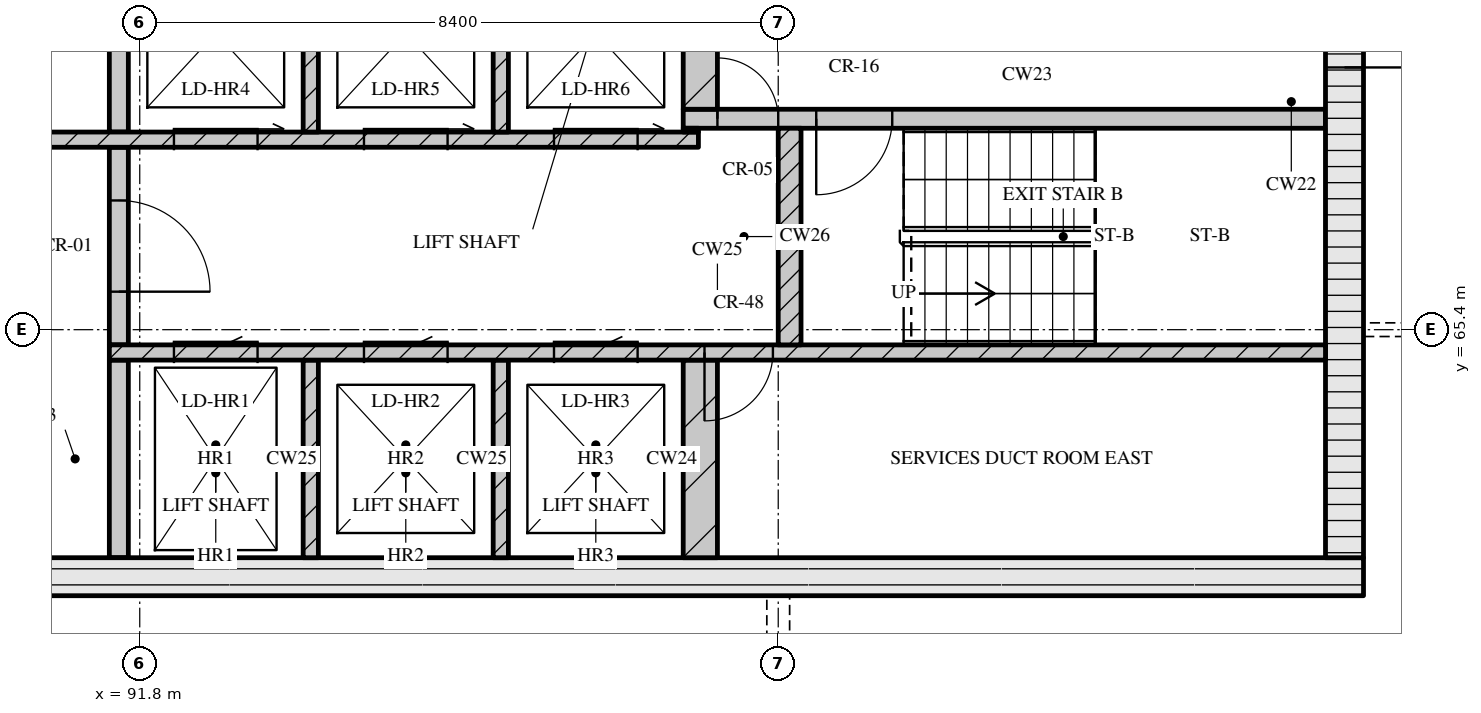
"""IFC4 building model, lengths in metres.
Left out: names, types, materials, properties, quantities, classifications, styles, units other than length and angle.
Written with IfcOpenShell. Run it as: python <this file> out.ifc"""

import sys

from ifc_helpers import new_model, si_unit, direction, frame, frame_2d, origin, place, context, subcontext, project, spatial, rectangle, extrude, element, fill, save


model = new_model("IFC4")
c1 = context("Model", 3, precision=1e-05, world=origin(), true_north=direction((0.0, 1.0)))
c2 = subcontext(c1, "Body", "Model", "MODEL_VIEW")
j1 = project(units=[si_unit("LENGTHUNIT", "METRE"), si_unit("PLANEANGLEUNIT", "RADIAN")], contexts=[c1])
p1 = place(None, origin())
s1 = spatial("IfcSite", under=j1, at=p1, CompositionType="ELEMENT")
p2 = place(p1, origin())
s2 = spatial("IfcBuilding", under=s1, at=p2, CompositionType="ELEMENT")
p3 = place(p2, frame((0.0, 0.0, 295.95)))
s3 = spatial("IfcBuildingStorey", under=s2, at=p3, CompositionType="ELEMENT", Elevation=295.95)
p4 = place(p3, frame((67.3, 62.15, 0.0), z_axis=(0.0, 0.0, 1.0), x_axis=(1.0, 0.0, 0.0)))
e1 = element("IfcWall", 1, at=p4, inside=s3, PredefinedType="SOLIDWALL", context=c2, shape_type="SweptSolid", body=[
    extrude(rectangle(XDim=40.6, YDim=0.5, at=frame_2d((20.3, 0.0))), origin(), (0.0, 0.0, 1.0), 3.32),
])
p5 = place(p4, frame((20.65, 0.0, 0.0)))
e2 = element("IfcOpeningElement", 2, at=p5, cuts=e1, PredefinedType="OPENING", context=c2, shape_type="SweptSolid", body=[
    extrude(rectangle(XDim=1.8, YDim=2.1, at=frame_2d((0.9, 1.05))), frame((0.0, 0.26, 0.0), z_axis=(0.0, -1.0, 0.0), x_axis=(1.0, 0.0, 0.0)), (0.0, 0.0, 1.0), 0.52),
])
p6 = place(p3, frame((107.65, 62.4, 0.0), z_axis=(0.0, 0.0, 1.0), x_axis=(0.0, 1.0, 0.0)))
e3 = element("IfcWall", 3, at=p6, inside=s3, PredefinedType="SOLIDWALL", context=c2, shape_type="SweptSolid", body=[
    extrude(rectangle(XDim=12.0, YDim=0.5, at=frame_2d((6.0, 0.0))), origin(), (0.0, 0.0, 1.0), 3.32),
])
p7 = place(p6, frame((6.45, 0.0, 0.0)))
e4 = element("IfcOpeningElement", 4, at=p7, cuts=e3, PredefinedType="OPENING", context=c2, shape_type="SweptSolid", body=[
    extrude(rectangle(XDim=1.2, YDim=2.1, at=frame_2d((0.6, 1.05))), frame((0.0, 0.26, 0.0), z_axis=(0.0, -1.0, 0.0), x_axis=(1.0, 0.0, 0.0)), (0.0, 0.0, 1.0), 0.52),
])
p8 = place(p3, frame((91.525, 62.4, 0.0), z_axis=(0.0, 0.0, 1.0), x_axis=(0.0, 1.0, 0.0)))
e5 = element("IfcWall", 5, at=p8, inside=s3, PredefinedType="SOLIDWALL", context=c2, shape_type="SweptSolid", body=[
    extrude(rectangle(XDim=2.6, YDim=0.25, at=frame_2d((1.3, 0.0))), origin(), (0.0, 0.0, 1.0), 3.32),
])
for number, where, z_axis, x_axis in (
    (6, (94.05, 62.4, 0.0), (0.0, 0.0, 1.0), (0.0, 1.0, 0.0)),
    (7, (96.55, 62.4, 0.0), (0.0, 0.0, 1.0), (0.0, 1.0, 0.0)),
):
    element("IfcWall", number, at=place(p3, frame(where, z_axis=z_axis, x_axis=x_axis)), inside=s3, PredefinedType="SOLIDWALL", context=c2, shape_type="SweptSolid", body=[
        extrude(rectangle(XDim=2.6, YDim=0.2, at=frame_2d((1.3, 0.0))), origin(), (0.0, 0.0, 1.0), 3.32),
    ])
p9 = place(p3, frame((99.175, 62.4, 0.0), z_axis=(0.0, 0.0, 1.0), x_axis=(0.0, 1.0, 0.0)))
e8 = element("IfcWall", 8, at=p9, inside=s3, PredefinedType="SOLIDWALL", context=c2, shape_type="SweptSolid", body=[
    extrude(rectangle(XDim=2.6, YDim=0.45, at=frame_2d((1.3, 0.0))), origin(), (0.0, 0.0, 1.0), 3.32),
])
p10 = place(p3, frame((91.4, 65.1, 0.0), z_axis=(0.0, 0.0, 1.0), x_axis=(1.0, 0.0, 0.0)))
e9 = element("IfcWall", 9, at=p10, inside=s3, PredefinedType="SOLIDWALL", context=c2, shape_type="SweptSolid", body=[
    extrude(rectangle(XDim=16.0, YDim=0.2, at=frame_2d((8.0, 0.0))), origin(), (0.0, 0.0, 1.0), 3.32),
])
p11 = place(p10, frame((0.85, 0.0, 0.0)))
e10 = element("IfcOpeningElement", 10, at=p11, cuts=e9, PredefinedType="OPENING", context=c2, shape_type="SweptSolid", body=[
    extrude(rectangle(XDim=1.1, YDim=2.1, at=frame_2d((0.55, 1.05))), frame((0.0, 0.11, 0.0), z_axis=(0.0, -1.0, 0.0), x_axis=(1.0, 0.0, 0.0)), (0.0, 0.0, 1.0), 0.22),
])
p12 = place(p10, frame((3.35, 0.0, 0.0)))
e11 = element("IfcOpeningElement", 11, at=p12, cuts=e9, PredefinedType="OPENING", context=c2, shape_type="SweptSolid", body=[
    extrude(rectangle(XDim=1.1, YDim=2.1, at=frame_2d((0.55, 1.05))), frame((0.0, 0.11, 0.0), z_axis=(0.0, -1.0, 0.0), x_axis=(1.0, 0.0, 0.0)), (0.0, 0.0, 1.0), 0.22),
])
p13 = place(p10, frame((5.85, 0.0, 0.0)))
e12 = element("IfcOpeningElement", 12, at=p13, cuts=e9, PredefinedType="OPENING", context=c2, shape_type="SweptSolid", body=[
    extrude(rectangle(XDim=1.1, YDim=2.1, at=frame_2d((0.55, 1.05))), frame((0.0, 0.11, 0.0), z_axis=(0.0, -1.0, 0.0), x_axis=(1.0, 0.0, 0.0)), (0.0, 0.0, 1.0), 0.22),
])
p14 = place(p10, frame((7.83, 0.0, 0.0)))
e13 = element("IfcOpeningElement", 13, at=p14, cuts=e9, PredefinedType="OPENING", context=c2, shape_type="SweptSolid", body=[
    extrude(rectangle(XDim=0.9, YDim=2.1, at=frame_2d((0.45, 1.05))), frame((0.0, 0.11, 0.0), z_axis=(0.0, -1.0, 0.0), x_axis=(1.0, 0.0, 0.0)), (0.0, 0.0, 1.0), 0.22),
])
p15 = place(p3, frame((91.525, 65.2, 0.0), z_axis=(0.0, 0.0, 1.0), x_axis=(0.0, 1.0, 0.0)))
e14 = element("IfcWall", 14, at=p15, inside=s3, PredefinedType="SOLIDWALL", context=c2, shape_type="SweptSolid", body=[
    extrude(rectangle(XDim=2.6, YDim=0.25, at=frame_2d((1.3, 0.0))), origin(), (0.0, 0.0, 1.0), 3.32),
])
p16 = place(p15, frame((0.7, 0.0, 0.0)))
e15 = element("IfcOpeningElement", 15, at=p16, cuts=e14, PredefinedType="OPENING", context=c2, shape_type="SweptSolid", body=[
    extrude(rectangle(XDim=1.2, YDim=2.1, at=frame_2d((0.6, 1.05))), frame((0.0, 0.135, 0.0), z_axis=(0.0, -1.0, 0.0), x_axis=(1.0, 0.0, 0.0)), (0.0, 0.0, 1.0), 0.27),
])
p17 = place(p3, frame((100.35, 65.2, 0.0), z_axis=(0.0, 0.0, 1.0), x_axis=(0.0, 1.0, 0.0)))
e16 = element("IfcWall", 16, at=p17, inside=s3, PredefinedType="SOLIDWALL", context=c2, shape_type="SweptSolid", body=[
    extrude(rectangle(XDim=2.85, YDim=0.3, at=frame_2d((1.425, 0.0))), origin(), (0.0, 0.0, 1.0), 3.32),
])
p18 = place(p3, frame((76.05, 67.9, 0.0), z_axis=(0.0, 0.0, 1.0), x_axis=(1.0, 0.0, 0.0)))
e17 = element("IfcWall", 17, at=p18, inside=s3, PredefinedType="SOLIDWALL", context=c2, shape_type="SweptSolid", body=[
    extrude(rectangle(XDim=23.1, YDim=0.2, at=frame_2d((11.55, 0.0))), origin(), (0.0, 0.0, 1.0), 3.32),
])
p19 = place(p18, frame((1.95, 0.0, 0.0)))
e18 = element("IfcOpeningElement", 18, at=p19, cuts=e17, PredefinedType="OPENING", context=c2, shape_type="SweptSolid", body=[
    extrude(rectangle(XDim=0.9, YDim=2.1, at=frame_2d((0.45, 1.05))), frame((0.0, 0.11, 0.0), z_axis=(0.0, -1.0, 0.0), x_axis=(1.0, 0.0, 0.0)), (0.0, 0.0, 1.0), 0.22),
])
p20 = place(p18, frame((5.66, 0.0, 0.0)))
e19 = element("IfcOpeningElement", 19, at=p20, cuts=e17, PredefinedType="OPENING", context=c2, shape_type="SweptSolid", body=[
    extrude(rectangle(XDim=0.9, YDim=2.1, at=frame_2d((0.45, 1.05))), frame((0.0, 0.11, 0.0), z_axis=(0.0, -1.0, 0.0), x_axis=(1.0, 0.0, 0.0)), (0.0, 0.0, 1.0), 0.22),
])
p21 = place(p18, frame((9.7, 0.0, 0.0)))
e20 = element("IfcOpeningElement", 20, at=p21, cuts=e17, PredefinedType="OPENING", context=c2, shape_type="SweptSolid", body=[
    extrude(rectangle(XDim=0.9, YDim=2.1, at=frame_2d((0.45, 1.05))), frame((0.0, 0.11, 0.0), z_axis=(0.0, -1.0, 0.0), x_axis=(1.0, 0.0, 0.0)), (0.0, 0.0, 1.0), 0.22),
])
p22 = place(p18, frame((13.55, 0.0, 0.0)))
e21 = element("IfcOpeningElement", 21, at=p22, cuts=e17, PredefinedType="OPENING", context=c2, shape_type="SweptSolid", body=[
    extrude(rectangle(XDim=1.0, YDim=2.1, at=frame_2d((0.5, 1.05))), frame((0.0, 0.11, 0.0), z_axis=(0.0, -1.0, 0.0), x_axis=(1.0, 0.0, 0.0)), (0.0, 0.0, 1.0), 0.22),
])
p23 = place(p18, frame((16.2, 0.0, 0.0)))
e22 = element("IfcOpeningElement", 22, at=p23, cuts=e17, PredefinedType="OPENING", context=c2, shape_type="SweptSolid", body=[
    extrude(rectangle(XDim=1.1, YDim=2.1, at=frame_2d((0.55, 1.05))), frame((0.0, 0.11, 0.0), z_axis=(0.0, -1.0, 0.0), x_axis=(1.0, 0.0, 0.0)), (0.0, 0.0, 1.0), 0.22),
])
p24 = place(p18, frame((18.7, 0.0, 0.0)))
e23 = element("IfcOpeningElement", 23, at=p24, cuts=e17, PredefinedType="OPENING", context=c2, shape_type="SweptSolid", body=[
    extrude(rectangle(XDim=1.1, YDim=2.1, at=frame_2d((0.55, 1.05))), frame((0.0, 0.11, 0.0), z_axis=(0.0, -1.0, 0.0), x_axis=(1.0, 0.0, 0.0)), (0.0, 0.0, 1.0), 0.22),
])
p25 = place(p18, frame((21.2, 0.0, 0.0)))
e24 = element("IfcOpeningElement", 24, at=p25, cuts=e17, PredefinedType="OPENING", context=c2, shape_type="SweptSolid", body=[
    extrude(rectangle(XDim=1.1, YDim=2.1, at=frame_2d((0.55, 1.05))), frame((0.0, 0.11, 0.0), z_axis=(0.0, -1.0, 0.0), x_axis=(1.0, 0.0, 0.0)), (0.0, 0.0, 1.0), 0.22),
])
p26 = place(p3, frame((91.525, 68.0, 0.0), z_axis=(0.0, 0.0, 1.0), x_axis=(0.0, 1.0, 0.0)))
e25 = element("IfcWall", 25, at=p26, inside=s3, PredefinedType="SOLIDWALL", context=c2, shape_type="SweptSolid", body=[
    extrude(rectangle(XDim=2.6, YDim=0.25, at=frame_2d((1.3, 0.0))), origin(), (0.0, 0.0, 1.0), 3.32),
])
for number, where, z_axis, x_axis in (
    (26, (94.05, 68.0, 0.0), (0.0, 0.0, 1.0), (0.0, 1.0, 0.0)),
    (27, (96.55, 68.0, 0.0), (0.0, 0.0, 1.0), (0.0, 1.0, 0.0)),
):
    element("IfcWall", number, at=place(p3, frame(where, z_axis=z_axis, x_axis=x_axis)), inside=s3, PredefinedType="SOLIDWALL", context=c2, shape_type="SweptSolid", body=[
        extrude(rectangle(XDim=2.6, YDim=0.2, at=frame_2d((1.3, 0.0))), origin(), (0.0, 0.0, 1.0), 3.32),
    ])
p27 = place(p3, frame((98.95, 68.025, 0.0), z_axis=(0.0, 0.0, 1.0), x_axis=(1.0, 0.0, 0.0)))
e28 = element("IfcWall", 28, at=p27, inside=s3, PredefinedType="SOLIDWALL", context=c2, shape_type="SweptSolid", body=[
    extrude(rectangle(XDim=0.2, YDim=0.05, at=frame_2d((0.1, 0.0))), origin(), (0.0, 0.0, 1.0), 3.32),
])
p28 = place(p3, frame((98.95, 68.175, 0.0), z_axis=(0.0, 0.0, 1.0), x_axis=(1.0, 0.0, 0.0)))
e29 = element("IfcWall", 29, at=p28, inside=s3, PredefinedType="SOLIDWALL", context=c2, shape_type="SweptSolid", body=[
    extrude(rectangle(XDim=8.45, YDim=0.25, at=frame_2d((4.225, 0.0))), origin(), (0.0, 0.0, 1.0), 3.32),
])
p29 = place(p28, frame((0.45, 0.0, 0.0)))
e30 = element("IfcOpeningElement", 30, at=p29, cuts=e29, PredefinedType="OPENING", context=c2, shape_type="SweptSolid", body=[
    extrude(rectangle(XDim=0.8, YDim=2.1, at=frame_2d((0.4, 1.05))), frame((0.0, 0.135, 0.0), z_axis=(0.0, -1.0, 0.0), x_axis=(1.0, 0.0, 0.0)), (0.0, 0.0, 1.0), 0.27),
])
p30 = place(p28, frame((1.75, 0.0, 0.0)))
e31 = element("IfcOpeningElement", 31, at=p30, cuts=e29, PredefinedType="OPENING", context=c2, shape_type="SweptSolid", body=[
    extrude(rectangle(XDim=1.0, YDim=2.1, at=frame_2d((0.5, 1.05))), frame((0.0, 0.135, 0.0), z_axis=(0.0, -1.0, 0.0), x_axis=(1.0, 0.0, 0.0)), (0.0, 0.0, 1.0), 0.27),
])
p31 = place(p3, frame((99.175, 68.3, 0.0), z_axis=(0.0, 0.0, 1.0), x_axis=(0.0, 1.0, 0.0)))
e32 = element("IfcWall", 32, at=p31, inside=s3, PredefinedType="SOLIDWALL", context=c2, shape_type="SweptSolid", body=[
    extrude(rectangle(XDim=2.3, YDim=0.45, at=frame_2d((1.15, 0.0))), origin(), (0.0, 0.0, 1.0), 3.32),
])
p32 = place(p11, origin())
e33 = element("IfcDoor", 33, at=p32, inside=s3, OperationType="SLIDING_TO_LEFT", PredefinedType="DOOR", context=c2, shape_type="SweptSolid", body=[
    extrude(rectangle(XDim=1.1, YDim=2.1, at=frame_2d((0.55, 1.05))), frame((0.0, 0.025, 0.0), z_axis=(0.0, -1.0, 0.0), x_axis=(1.0, 0.0, 0.0)), (0.0, 0.0, 1.0), 0.05),
])
fill(e10, e33)
p33 = place(p12, origin())
e34 = element("IfcDoor", 34, at=p33, inside=s3, OperationType="SLIDING_TO_LEFT", PredefinedType="DOOR", context=c2, shape_type="SweptSolid", body=[
    extrude(rectangle(XDim=1.1, YDim=2.1, at=frame_2d((0.55, 1.05))), frame((0.0, 0.025, 0.0), z_axis=(0.0, -1.0, 0.0), x_axis=(1.0, 0.0, 0.0)), (0.0, 0.0, 1.0), 0.05),
])
fill(e11, e34)
p34 = place(p13, origin())
e35 = element("IfcDoor", 35, at=p34, inside=s3, OperationType="SLIDING_TO_LEFT", PredefinedType="DOOR", context=c2, shape_type="SweptSolid", body=[
    extrude(rectangle(XDim=1.1, YDim=2.1, at=frame_2d((0.55, 1.05))), frame((0.0, 0.025, 0.0), z_axis=(0.0, -1.0, 0.0), x_axis=(1.0, 0.0, 0.0)), (0.0, 0.0, 1.0), 0.05),
])
fill(e12, e35)
p35 = place(p14, origin())
e36 = element("IfcDoor", 36, at=p35, inside=s3, OperationType="SINGLE_SWING_RIGHT", PredefinedType="DOOR", context=c2, shape_type="SweptSolid", body=[
    extrude(rectangle(XDim=0.9, YDim=2.1, at=frame_2d((0.45, 1.05))), frame((0.0, 0.025, 0.0), z_axis=(0.0, -1.0, 0.0), x_axis=(1.0, 0.0, 0.0)), (0.0, 0.0, 1.0), 0.05),
])
fill(e13, e36)
p36 = place(p16, origin())
e37 = element("IfcDoor", 37, at=p36, inside=s3, OperationType="SINGLE_SWING_RIGHT", PredefinedType="DOOR", context=c2, shape_type="SweptSolid", body=[
    extrude(rectangle(XDim=1.2, YDim=2.1, at=frame_2d((0.6, 1.05))), frame((0.0, 0.025, 0.0), z_axis=(0.0, -1.0, 0.0), x_axis=(1.0, 0.0, 0.0)), (0.0, 0.0, 1.0), 0.05),
])
fill(e15, e37)
p37 = place(p23, origin())
e38 = element("IfcDoor", 38, at=p37, inside=s3, OperationType="SLIDING_TO_RIGHT", PredefinedType="DOOR", context=c2, shape_type="SweptSolid", body=[
    extrude(rectangle(XDim=1.1, YDim=2.1, at=frame_2d((0.55, 1.05))), frame((0.0, 0.025, 0.0), z_axis=(0.0, -1.0, 0.0), x_axis=(1.0, 0.0, 0.0)), (0.0, 0.0, 1.0), 0.05),
])
fill(e22, e38)
p38 = place(p24, origin())
e39 = element("IfcDoor", 39, at=p38, inside=s3, OperationType="SLIDING_TO_RIGHT", PredefinedType="DOOR", context=c2, shape_type="SweptSolid", body=[
    extrude(rectangle(XDim=1.1, YDim=2.1, at=frame_2d((0.55, 1.05))), frame((0.0, 0.025, 0.0), z_axis=(0.0, -1.0, 0.0), x_axis=(1.0, 0.0, 0.0)), (0.0, 0.0, 1.0), 0.05),
])
fill(e23, e39)
p39 = place(p25, origin())
e40 = element("IfcDoor", 40, at=p39, inside=s3, OperationType="SLIDING_TO_RIGHT", PredefinedType="DOOR", context=c2, shape_type="SweptSolid", body=[
    extrude(rectangle(XDim=1.1, YDim=2.1, at=frame_2d((0.55, 1.05))), frame((0.0, 0.025, 0.0), z_axis=(0.0, -1.0, 0.0), x_axis=(1.0, 0.0, 0.0)), (0.0, 0.0, 1.0), 0.05),
])
fill(e24, e40)
p40 = place(p29, origin())
e41 = element("IfcDoor", 41, at=p40, inside=s3, OperationType="SINGLE_SWING_LEFT", PredefinedType="DOOR", context=c2, shape_type="SweptSolid", body=[
    extrude(rectangle(XDim=0.8, YDim=2.1, at=frame_2d((0.4, 1.05))), frame((0.0, 0.025, 0.0), z_axis=(0.0, -1.0, 0.0), x_axis=(1.0, 0.0, 0.0)), (0.0, 0.0, 1.0), 0.05),
])
fill(e30, e41)
p41 = place(p30, origin())
e42 = element("IfcDoor", 42, at=p41, inside=s3, OperationType="SINGLE_SWING_RIGHT", PredefinedType="DOOR", context=c2, shape_type="SweptSolid", body=[
    extrude(rectangle(XDim=1.0, YDim=2.1, at=frame_2d((0.5, 1.05))), frame((0.0, 0.025, 0.0), z_axis=(0.0, -1.0, 0.0), x_axis=(1.0, 0.0, 0.0)), (0.0, 0.0, 1.0), 0.05),
])
fill(e31, e42)
p42 = place(p7, origin())
e43 = element("IfcDoor", 43, at=p42, inside=s3, OperationType="SINGLE_SWING_RIGHT", PredefinedType="DOOR", context=c2, shape_type="SweptSolid", body=[
    extrude(rectangle(XDim=1.2, YDim=2.1, at=frame_2d((0.6, 1.05))), frame((0.0, 0.025, 0.0), z_axis=(0.0, -1.0, 0.0), x_axis=(1.0, 0.0, 0.0)), (0.0, 0.0, 1.0), 0.05),
])
fill(e4, e43)
save(model, sys.argv[1])
